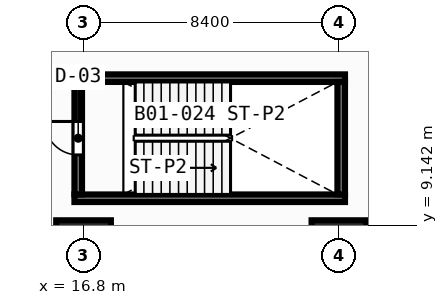
"""IFC4 building model, lengths in metres.
Left out: names, types, materials, properties, quantities, classifications, styles, units other than length and angle.
Written with IfcOpenShell. Run it as: python <this file> out.ifc"""

import sys

from ifc_helpers import new_model, si_unit, direction, frame, frame_2d, origin, origin_2d, place, context, subcontext, project, spatial, rectangle, extrude, element, fill, save


model = new_model("IFC4")
c1 = context("Model", 3, precision=1e-05, world=origin(), true_north=direction((0.0, 1.0)))
c2 = subcontext(c1, "Body", "Model", "MODEL_VIEW")
j1 = project(units=[si_unit("LENGTHUNIT", "METRE"), si_unit("PLANEANGLEUNIT", "RADIAN")], contexts=[c1])
p1 = place(None, origin())
s1 = spatial("IfcSite", under=j1, at=p1, CompositionType="ELEMENT")
p2 = place(p1, origin())
s2 = spatial("IfcBuilding", under=s1, at=p2, CompositionType="ELEMENT")
p3 = place(p2, frame((0.0, 0.0, -4.2)))
s3 = spatial("IfcBuildingStorey", under=s2, at=p3, CompositionType="ELEMENT", Elevation=-4.2)
for number, where, z_axis, x_axis in (
    (1, (16.5, 10.025, 0.0), (0.0, 0.0, 1.0), (1.0, 0.0, 0.0)),
    (2, (16.5, 13.975, 0.0), (0.0, 0.0, 1.0), (1.0, 0.0, 0.0)),
):
    element("IfcWall", number, at=place(p3, frame(where, z_axis=z_axis, x_axis=x_axis)), inside=s3, PredefinedType="SOLIDWALL", context=c2, shape_type="SweptSolid", body=[
        extrude(rectangle(XDim=8.9, YDim=0.25, at=frame_2d((4.45, 0.0))), origin(), (0.0, 0.0, 1.0), 3.85),
    ])
p4 = place(p3, frame((25.275, 10.15, 0.0), z_axis=(0.0, 0.0, 1.0), x_axis=(0.0, 1.0, 0.0)))
e3 = element("IfcWall", 3, at=p4, inside=s3, PredefinedType="SOLIDWALL", context=c2, shape_type="SweptSolid", body=[
    extrude(rectangle(XDim=3.7, YDim=0.25, at=frame_2d((1.85, 0.0))), origin(), (0.0, 0.0, 1.0), 3.85),
])
for number, where, z_axis, x_axis in (
    (4, (16.8, 8.4, 0.0), (0.0, 0.0, 1.0), (1.0, 0.0, 0.0)),
    (5, (25.2, 8.4, 0.0), (0.0, 0.0, 1.0), (1.0, 0.0, 0.0)),
):
    element("IfcColumn", number, at=place(p3, frame(where, z_axis=z_axis, x_axis=x_axis)), inside=s3, PredefinedType="COLUMN", context=c2, shape_type="SweptSolid", body=[
        extrude(rectangle(XDim=1.8, YDim=1.8, at=origin_2d()), origin(), (0.0, 0.0, 1.0), 4.2),
    ])
p5 = place(p3, frame((16.625, 10.15, 0.0), z_axis=(0.0, 0.0, 1.0), x_axis=(0.0, 1.0, 0.0)))
e6 = element("IfcWall", 6, at=p5, inside=s3, PredefinedType="SOLIDWALL", context=c2, shape_type="SweptSolid", body=[
    extrude(rectangle(XDim=3.7, YDim=0.25, at=frame_2d((1.85, 0.0))), origin(), (0.0, 0.0, 1.0), 3.85),
])
p6 = place(p5, frame((1.3, 0.0, 0.0)))
e7 = element("IfcOpeningElement", 7, at=p6, cuts=e6, PredefinedType="OPENING", context=c2, shape_type="SweptSolid", body=[
    extrude(rectangle(XDim=1.1, YDim=2.15, at=frame_2d((0.55, 1.075))), frame((0.0, 0.135, 0.0), z_axis=(0.0, -1.0, 0.0), x_axis=(1.0, 0.0, 0.0)), (0.0, 0.0, 1.0), 0.27),
])
p7 = place(p6, origin())
e8 = element("IfcDoor", 8, at=p7, inside=s3, OperationType="SINGLE_SWING_RIGHT", PredefinedType="DOOR", context=c2, shape_type="SweptSolid", body=[
    extrude(rectangle(XDim=1.1, YDim=2.15, at=frame_2d((0.55, 1.075))), frame((0.0, 0.025, 0.0), z_axis=(0.0, -1.0, 0.0), x_axis=(1.0, 0.0, 0.0)), (0.0, 0.0, 1.0), 0.05),
])
fill(e7, e8)
save(model, sys.argv[1])
